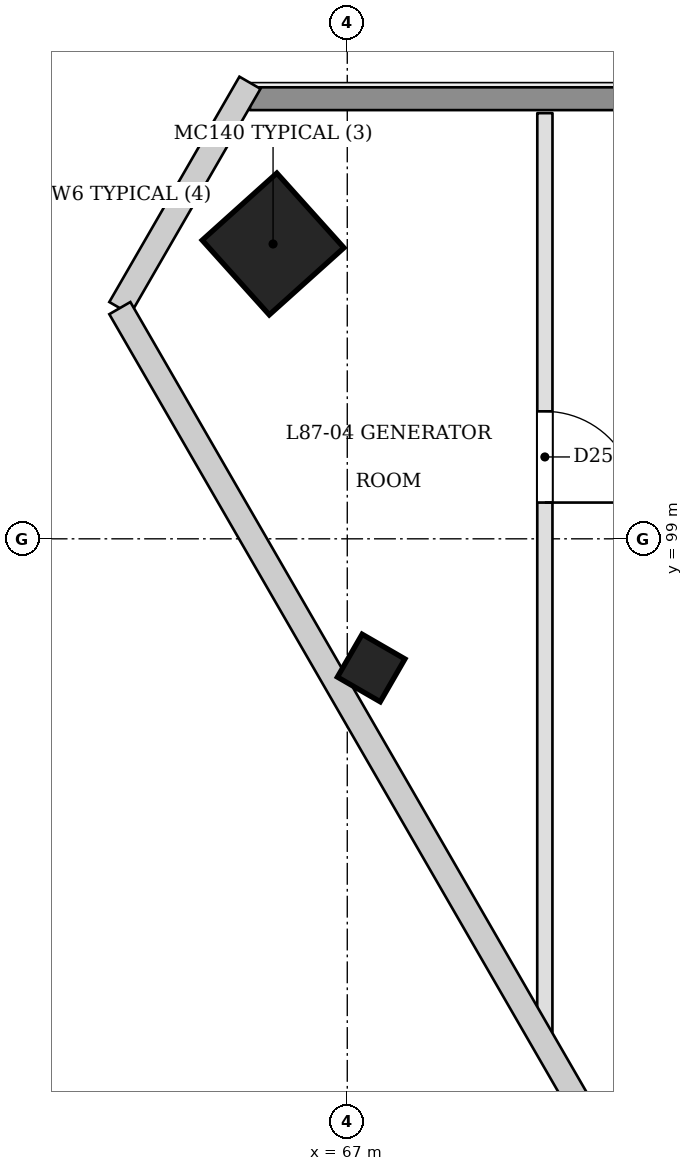
"""IFC4 building model, lengths in metres.
Left out: names, types, materials, properties, quantities, classifications, styles, units other than length and angle.
Written with IfcOpenShell. Run it as: python <this file> out.ifc"""

import sys

from ifc_helpers import new_model, si_unit, direction, frame, frame_2d, origin, origin_2d, place, context, subcontext, project, spatial, rectangle, extrude, element, fill, save


model = new_model("IFC4")
c1 = context("Model", 3, precision=1e-05, world=origin(), true_north=direction((0.0, 1.0)))
c2 = subcontext(c1, "Body", "Model", "MODEL_VIEW")
j1 = project(units=[si_unit("LENGTHUNIT", "METRE"), si_unit("PLANEANGLEUNIT", "RADIAN")], contexts=[c1])
p1 = place(None, origin())
s1 = spatial("IfcSite", under=j1, at=p1, CompositionType="ELEMENT")
p2 = place(p1, origin())
s2 = spatial("IfcBuilding", under=s1, at=p2, CompositionType="ELEMENT")
p3 = place(p2, frame((0.0, 0.0, 334.6)))
s3 = spatial("IfcBuildingStorey", under=s2, at=p3, CompositionType="ELEMENT", Elevation=334.6)
p4 = place(p3, frame((65.99, 102.868, 0.0), z_axis=(0.028412585289, 0.009238447977, 0.999553588396), x_axis=(-0.865380735886, 0.500716836341, 0.019970772707)))
e1 = element("IfcColumn", 1, at=p4, inside=s3, PredefinedType="COLUMN", context=c2, shape_type="SweptSolid", body=[
    extrude(rectangle(XDim=1.32, YDim=1.32, at=origin_2d()), origin(), (0.0, 0.0, 1.0), 4.202),
])
p5 = place(p3, frame((67.287, 97.254, -0.02), z_axis=(0.022183545815, 0.038443736465, 0.999014499105), x_axis=(-0.865477943446, -0.499470111252, 0.03843874836)))
e2 = element("IfcColumn", 2, at=p5, inside=s3, PredefinedType="COLUMN", context=c2, shape_type="SweptSolid", body=[
    extrude(rectangle(XDim=0.65, YDim=0.65, at=origin_2d()), origin(), (0.0, 0.0, 1.0), 4.204),
])
p6 = place(p3, frame((69.6, 104.6, 0.0), z_axis=(0.0, 0.0, 1.0), x_axis=(-8.0781969e-05, -0.999999996737, 0.0)))
e3 = element("IfcWall", 3, at=p6, inside=s3, PredefinedType="PARTITIONING", context=c2, shape_type="SweptSolid", body=[
    extrude(rectangle(XDim=12.089, YDim=0.2, at=frame_2d((6.044, 0.0))), origin(), (0.0, 0.0, 1.0), 3.9),
])
p7 = place(p6, frame((3.923, 0.0, 0.0)))
e4 = element("IfcOpeningElement", 4, at=p7, cuts=e3, PredefinedType="OPENING", context=c2, shape_type="SweptSolid", body=[
    extrude(rectangle(XDim=1.2, YDim=2.4, at=frame_2d((0.6, 1.2))), frame((0.0, 0.11, 0.0), z_axis=(0.0, -1.0, 0.0), x_axis=(1.0, 0.0, 0.0)), (0.0, 0.0, 1.0), 0.221),
])
p8 = place(p3, frame((65.72, 104.79, 0.0), z_axis=(0.0, 0.0, 1.0), x_axis=(1.0, 0.0, 0.0)))
e5 = element("IfcWall", 5, at=p8, inside=s3, PredefinedType="SOLIDWALL", context=c2, shape_type="SweptSolid", body=[
    extrude(rectangle(XDim=38.561, YDim=0.3, at=frame_2d((19.28, 0.0))), origin(), (0.0, 0.0, 1.0), 3.9),
])
p9 = place(p7, origin())
e6 = element("IfcDoor", 6, at=p9, inside=s3, OperationType="SINGLE_SWING_RIGHT", PredefinedType="NOTDEFINED", context=c2, shape_type="SweptSolid", body=[
    extrude(rectangle(XDim=1.2, YDim=2.4, at=frame_2d((0.6, 1.2))), frame((0.0, 0.025, 0.0), z_axis=(0.0, -1.0, 0.0), x_axis=(1.0, 0.0, 0.0)), (0.0, 0.0, 1.0), 0.05),
])
fill(e4, e6)
save(model, sys.argv[1])
